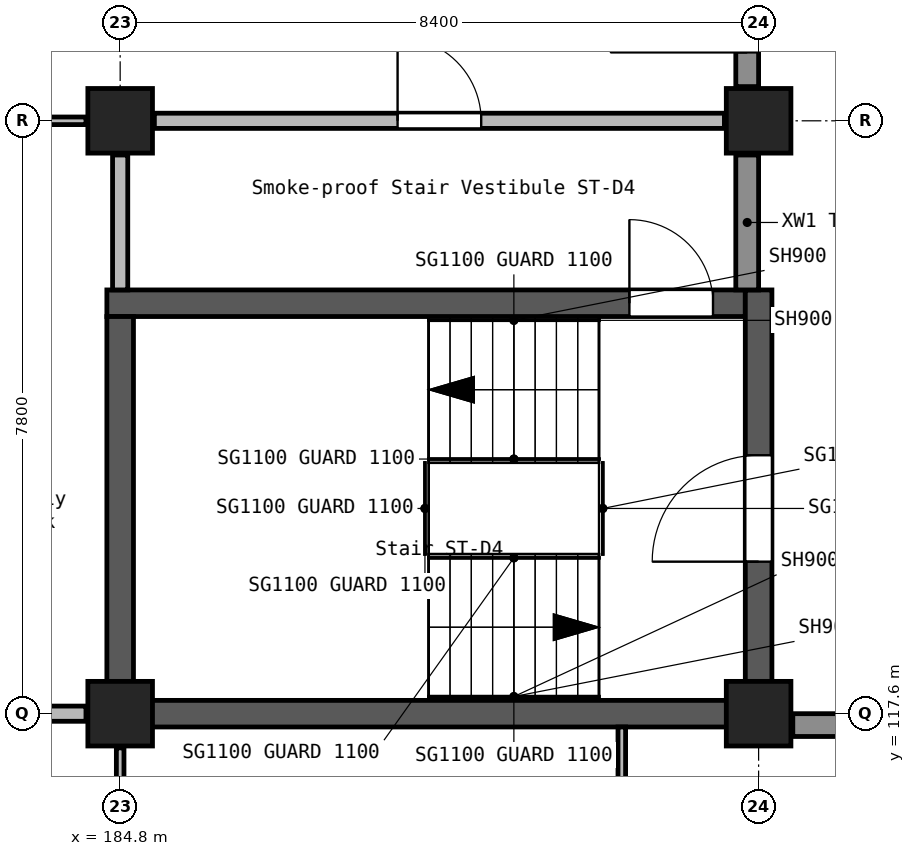
"""IFC4 building model, lengths in metres.
Left out: names, types, materials, properties, quantities, classifications, styles, units other than length and angle.
Written with IfcOpenShell. Run it as: python <this file> out.ifc"""

import sys

from ifc_helpers import new_model, si_unit, direction, frame, frame_2d, origin, origin_2d, place, context, subcontext, project, spatial, rectangle, extrude, element, fill, save


model = new_model("IFC4")
c1 = context("Model", 3, precision=1e-05, world=origin(), true_north=direction((0.0, 1.0)))
c2 = subcontext(c1, "Body", "Model", "MODEL_VIEW")
j1 = project(units=[si_unit("LENGTHUNIT", "METRE"), si_unit("PLANEANGLEUNIT", "RADIAN")], contexts=[c1])
p1 = place(None, origin())
s1 = spatial("IfcSite", under=j1, at=p1, CompositionType="ELEMENT")
p2 = place(p1, origin())
s2 = spatial("IfcBuilding", under=s1, at=p2, CompositionType="ELEMENT")
p3 = place(p2, origin())
s3 = spatial("IfcBuildingStorey", under=s2, at=p3, CompositionType="ELEMENT", Elevation=0.0)
for number, where, z_axis, x_axis in (
    (1, (184.8, 117.6, -0.3), (0.0, 0.0, 1.0), (1.0, 0.0, 0.0)),
    (2, (184.8, 125.4, -0.3), (0.0, 0.0, 1.0), (1.0, 0.0, 0.0)),
    (3, (193.2, 117.6, -0.3), (0.0, 0.0, 1.0), (1.0, 0.0, 0.0)),
    (4, (193.2, 125.4, -0.3), (0.0, 0.0, 1.0), (1.0, 0.0, 0.0)),
):
    element("IfcColumn", number, at=place(p3, frame(where, z_axis=z_axis, x_axis=x_axis)), inside=s3, PredefinedType="COLUMN", context=c2, shape_type="SweptSolid", body=[
        extrude(rectangle(XDim=0.85, YDim=0.85, at=origin_2d()), origin(), (0.0, 0.0, 1.0), 5.7),
    ])
p4 = place(p3, frame((184.625, 123.0, -0.3), z_axis=(0.0, 0.0, 1.0), x_axis=(1.0, 0.0, 0.0)))
e5 = element("IfcWall", 5, at=p4, inside=s3, PredefinedType="SHEAR", context=c2, shape_type="SweptSolid", body=[
    extrude(rectangle(XDim=8.4, YDim=0.35, at=frame_2d((4.2, 0.0))), origin(), (0.0, 0.0, 1.0), 5.7),
])
p5 = place(p4, frame((6.875, 0.0, 0.3)))
e6 = element("IfcOpeningElement", 6, at=p5, cuts=e5, PredefinedType="OPENING", context=c2, shape_type="SweptSolid", body=[
    extrude(rectangle(XDim=1.1, YDim=2.1, at=frame_2d((0.55, 1.05))), frame((0.0, 0.185, 0.0), z_axis=(0.0, -1.0, 0.0), x_axis=(1.0, 0.0, 0.0)), (0.0, 0.0, 1.0), 0.37),
])
p6 = place(p3, frame((184.8, 117.425, -0.3), z_axis=(0.0, 0.0, 1.0), x_axis=(0.0, 1.0, 0.0)))
e7 = element("IfcWall", 7, at=p6, inside=s3, PredefinedType="SHEAR", context=c2, shape_type="SweptSolid", body=[
    extrude(rectangle(XDim=5.4, YDim=0.35, at=frame_2d((2.7, 0.0))), origin(), (0.0, 0.0, 1.0), 5.7),
])
p7 = place(p3, frame((184.975, 117.6, -0.3), z_axis=(0.0, 0.0, 1.0), x_axis=(1.0, 0.0, 0.0)))
e8 = element("IfcWall", 8, at=p7, inside=s3, PredefinedType="SHEAR", context=c2, shape_type="SweptSolid", body=[
    extrude(rectangle(XDim=8.05, YDim=0.35, at=frame_2d((4.025, 0.0))), origin(), (0.0, 0.0, 1.0), 5.7),
])
p8 = place(p3, frame((193.2, 117.425, -0.3), z_axis=(0.0, 0.0, 1.0), x_axis=(0.0, 1.0, 0.0)))
e9 = element("IfcWall", 9, at=p8, inside=s3, PredefinedType="SHEAR", context=c2, shape_type="SweptSolid", body=[
    extrude(rectangle(XDim=5.75, YDim=0.35, at=frame_2d((2.875, 0.0))), origin(), (0.0, 0.0, 1.0), 5.7),
])
p9 = place(p8, frame((2.175, 0.0, 0.3)))
e10 = element("IfcOpeningElement", 10, at=p9, cuts=e9, PredefinedType="OPENING", context=c2, shape_type="SweptSolid", body=[
    extrude(rectangle(XDim=1.4, YDim=2.1, at=frame_2d((0.7, 1.05))), frame((0.0, 0.185, 0.0), z_axis=(0.0, -1.0, 0.0), x_axis=(1.0, 0.0, 0.0)), (0.0, 0.0, 1.0), 0.37),
])
p10 = place(p3, frame((197.0, 117.45, 0.0), z_axis=(0.0, 0.0, 1.0), x_axis=(-1.0, 0.0, 0.0)))
e11 = element("IfcWall", 11, at=p10, inside=s3, PredefinedType="STANDARD", context=c2, shape_type="SweptSolid", body=[
    extrude(rectangle(XDim=3.35, YDim=0.3, at=frame_2d((1.675, 0.0))), origin(), (0.0, 0.0, 1.0), 4.25),
])
p11 = place(p10, frame((1.075, 0.0, 1.2)))
e12 = element("IfcOpeningElement", 12, at=p11, cuts=e11, PredefinedType="OPENING", context=c2, shape_type="SweptSolid", body=[
    extrude(rectangle(XDim=1.2, YDim=1.2, at=frame_2d((0.6, 0.6))), frame((0.0, 0.16, 0.0), z_axis=(0.0, -1.0, 0.0), x_axis=(1.0, 0.0, 0.0)), (0.0, 0.0, 1.0), 0.32),
])
p12 = place(p3, frame((193.05, 123.175, 0.0), z_axis=(0.0, 0.0, 1.0), x_axis=(0.0, 1.0, 0.0)))
e13 = element("IfcWall", 13, at=p12, inside=s3, PredefinedType="STANDARD", context=c2, shape_type="SweptSolid", body=[
    extrude(rectangle(XDim=1.775, YDim=0.3, at=frame_2d((0.887, 0.0))), origin(), (0.0, 0.0, 1.0), 4.25),
])
p13 = place(p3, frame((193.05, 125.85, 0.0), z_axis=(0.0, 0.0, 1.0), x_axis=(0.0, 1.0, 0.0)))
e14 = element("IfcWall", 14, at=p13, inside=s3, PredefinedType="STANDARD", context=c2, shape_type="SweptSolid", body=[
    extrude(rectangle(XDim=2.7, YDim=0.3, at=frame_2d((1.35, 0.0))), origin(), (0.0, 0.0, 1.0), 4.25),
])
p14 = place(p13, frame((0.45, 0.0, 0.0)))
e15 = element("IfcOpeningElement", 15, at=p14, cuts=e14, PredefinedType="OPENING", context=c2, shape_type="SweptSolid", body=[
    extrude(rectangle(XDim=1.8, YDim=2.1, at=frame_2d((0.9, 1.05))), frame((0.0, 0.16, 0.0), z_axis=(0.0, -1.0, 0.0), x_axis=(1.0, 0.0, 0.0)), (0.0, 0.0, 1.0), 0.32),
])
p15 = place(p3, frame((184.35, 117.6, 0.0), z_axis=(0.0, 0.0, 1.0), x_axis=(-1.0, 0.0, 0.0)))
e16 = element("IfcWall", 16, at=p15, inside=s3, PredefinedType="SOLIDWALL", context=c2, shape_type="SweptSolid", body=[
    extrude(rectangle(XDim=7.5, YDim=0.2, at=frame_2d((3.75, 0.0))), origin(), (0.0, 0.0, 1.0), 4.28),
])
p16 = place(p3, frame((185.25, 125.4, 0.0), z_axis=(0.0, 0.0, 1.0), x_axis=(1.0, 0.0, 0.0)))
e17 = element("IfcWall", 17, at=p16, inside=s3, PredefinedType="SOLIDWALL", context=c2, shape_type="SweptSolid", body=[
    extrude(rectangle(XDim=7.5, YDim=0.2, at=frame_2d((3.75, 0.0))), origin(), (0.0, 0.0, 1.0), 5.05),
])
p17 = place(p16, frame((3.2, 0.0, 0.0)))
e18 = element("IfcOpeningElement", 18, at=p17, cuts=e17, PredefinedType="OPENING", context=c2, shape_type="SweptSolid", body=[
    extrude(rectangle(XDim=1.1, YDim=2.1, at=frame_2d((0.55, 1.05))), frame((0.0, 0.11, 0.0), z_axis=(0.0, -1.0, 0.0), x_axis=(1.0, 0.0, 0.0)), (0.0, 0.0, 1.0), 0.22),
])
p18 = place(p3, frame((184.8, 123.175, 0.0), z_axis=(0.0, 0.0, 1.0), x_axis=(0.0, 1.0, 0.0)))
e19 = element("IfcWall", 19, at=p18, inside=s3, PredefinedType="SOLIDWALL", context=c2, shape_type="SweptSolid", body=[
    extrude(rectangle(XDim=1.775, YDim=0.2, at=frame_2d((0.887, 0.0))), origin(), (0.0, 0.0, 1.0), 5.05),
])
p19 = place(p3, frame((184.8, 117.15, 0.0), z_axis=(0.0, 0.0, 1.0), x_axis=(0.0, -1.0, 0.0)))
e20 = element("IfcWall", 20, at=p19, inside=s3, PredefinedType="PARTITIONING", context=c2, shape_type="SweptSolid", body=[
    extrude(rectangle(XDim=18.2, YDim=0.1, at=frame_2d((9.1, 0.0))), origin(), (0.0, 0.0, 1.0), 5.05),
])
p20 = place(p19, frame((11.7, 0.0, 0.0)))
e21 = element("IfcOpeningElement", 21, at=p20, cuts=e20, PredefinedType="OPENING", context=c2, shape_type="SweptSolid", body=[
    extrude(rectangle(XDim=0.9, YDim=2.1, at=frame_2d((0.45, 1.05))), frame((0.0, 0.06, 0.0), z_axis=(0.0, -1.0, 0.0), x_axis=(1.0, 0.0, 0.0)), (0.0, 0.0, 1.0), 0.12),
])
p21 = place(p19, frame((5.7, 0.0, 0.0)))
e22 = element("IfcOpeningElement", 22, at=p21, cuts=e20, PredefinedType="OPENING", context=c2, shape_type="SweptSolid", body=[
    extrude(rectangle(XDim=0.9, YDim=2.1, at=frame_2d((0.45, 1.05))), frame((0.0, 0.06, 0.0), z_axis=(0.0, -1.0, 0.0), x_axis=(1.0, 0.0, 0.0)), (0.0, 0.0, 1.0), 0.12),
])
p22 = place(p19, frame((1.5, 0.0, 0.0)))
e23 = element("IfcOpeningElement", 23, at=p22, cuts=e20, PredefinedType="OPENING", context=c2, shape_type="SweptSolid", body=[
    extrude(rectangle(XDim=0.9, YDim=2.1, at=frame_2d((0.45, 1.05))), frame((0.0, 0.06, 0.0), z_axis=(0.0, -1.0, 0.0), x_axis=(1.0, 0.0, 0.0)), (0.0, 0.0, 1.0), 0.12),
])
p23 = place(p3, frame((191.4, 117.425, 0.0), z_axis=(0.0, 0.0, 1.0), x_axis=(0.0, -1.0, 0.0)))
e24 = element("IfcWall", 24, at=p23, inside=s3, PredefinedType="PARTITIONING", context=c2, shape_type="SweptSolid", body=[
    extrude(rectangle(XDim=18.475, YDim=0.1, at=frame_2d((9.238, 0.0))), origin(), (0.0, 0.0, 1.0), 5.05),
])
p24 = place(p3, frame((181.3, 125.4, 0.0), z_axis=(0.0, 0.0, 1.0), x_axis=(1.0, 0.0, 0.0)))
e25 = element("IfcWall", 25, at=p24, inside=s3, PredefinedType="PARTITIONING", context=c2, shape_type="SweptSolid", body=[
    extrude(rectangle(XDim=3.05, YDim=0.1, at=frame_2d((1.525, 0.0))), origin(), (0.0, 0.0, 1.0), 5.05),
])
p25 = place(p24, frame((1.25, 0.0, 0.0)))
e26 = element("IfcOpeningElement", 26, at=p25, cuts=e25, PredefinedType="OPENING", context=c2, shape_type="SweptSolid", body=[
    extrude(rectangle(XDim=0.9, YDim=2.1, at=frame_2d((0.45, 1.05))), frame((0.0, 0.06, 0.0), z_axis=(0.0, -1.0, 0.0), x_axis=(1.0, 0.0, 0.0)), (0.0, 0.0, 1.0), 0.12),
])
p26 = place(p9, frame((1.4, 0.0, 0.0), z_axis=(0.0, 0.0, 1.0), x_axis=(-1.0, 0.0, 0.0)))
e27 = element("IfcDoor", 27, at=p26, inside=s3, OperationType="SINGLE_SWING_LEFT", PredefinedType="DOOR", context=c2, shape_type="SweptSolid", body=[
    extrude(rectangle(XDim=1.4, YDim=2.1, at=frame_2d((0.7, 1.05))), frame((0.0, 0.025, 0.0), z_axis=(0.0, -1.0, 0.0), x_axis=(1.0, 0.0, 0.0)), (0.0, 0.0, 1.0), 0.05),
])
fill(e10, e27)
p27 = place(p5, frame((1.1, 0.0, 0.0), z_axis=(0.0, 0.0, 1.0), x_axis=(-1.0, 0.0, 0.0)))
e28 = element("IfcDoor", 28, at=p27, inside=s3, OperationType="SINGLE_SWING_LEFT", PredefinedType="DOOR", context=c2, shape_type="SweptSolid", body=[
    extrude(rectangle(XDim=1.1, YDim=2.1, at=frame_2d((0.55, 1.05))), frame((0.0, 0.025, 0.0), z_axis=(0.0, -1.0, 0.0), x_axis=(1.0, 0.0, 0.0)), (0.0, 0.0, 1.0), 0.05),
])
fill(e6, e28)
p28 = place(p17, frame((1.1, 0.0, 0.0), z_axis=(0.0, 0.0, 1.0), x_axis=(-1.0, 0.0, 0.0)))
e29 = element("IfcDoor", 29, at=p28, inside=s3, OperationType="SINGLE_SWING_LEFT", PredefinedType="DOOR", context=c2, shape_type="SweptSolid", body=[
    extrude(rectangle(XDim=1.1, YDim=2.1, at=frame_2d((0.55, 1.05))), frame((0.0, 0.025, 0.0), z_axis=(0.0, -1.0, 0.0), x_axis=(1.0, 0.0, 0.0)), (0.0, 0.0, 1.0), 0.05),
])
fill(e18, e29)
save(model, sys.argv[1])
